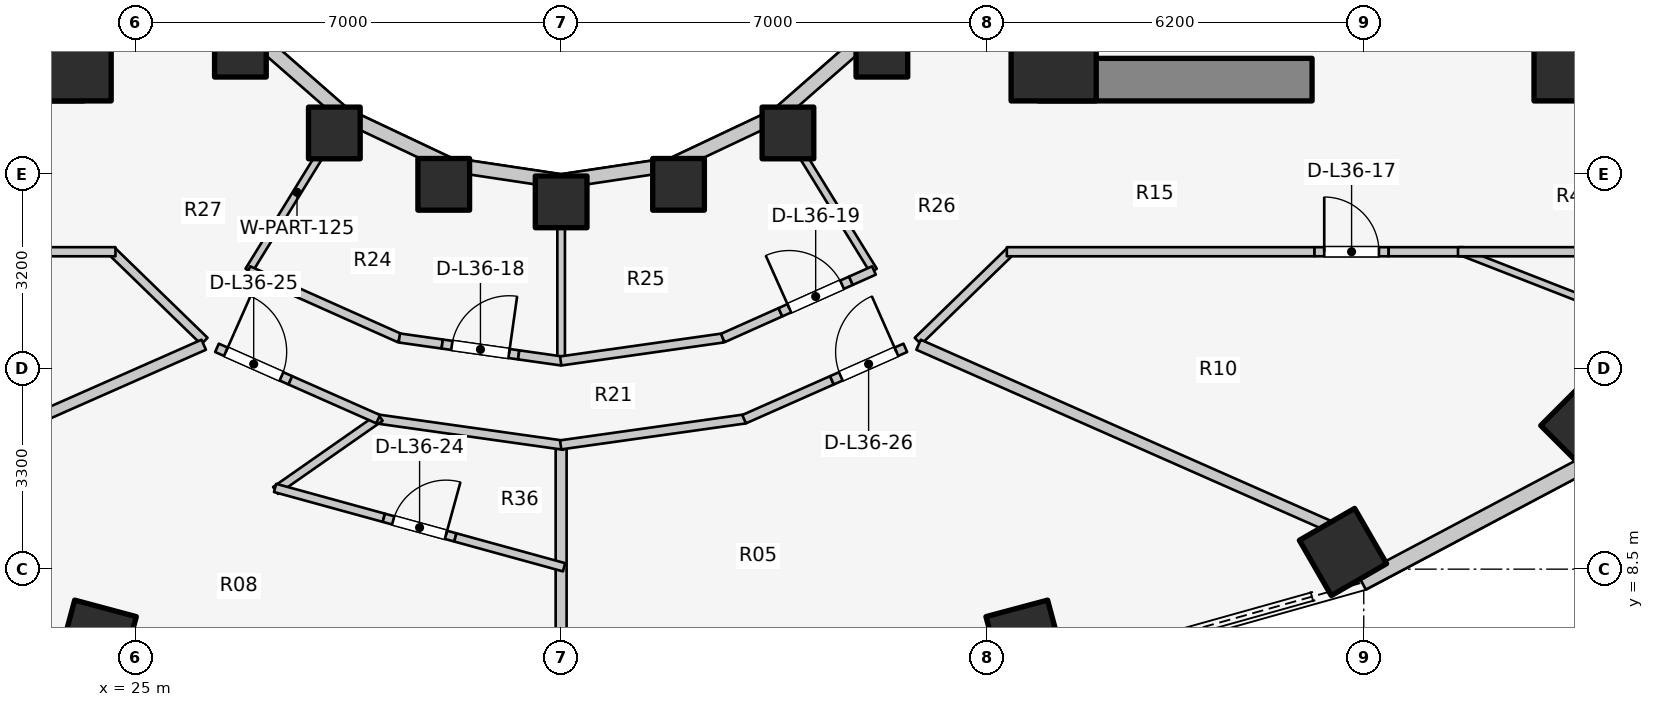
"""IFC4 building model, lengths in metres.
Left out: names, types, materials, properties, quantities, classifications, styles, units other than length and angle.
Written with IfcOpenShell. Run it as: python <this file> out.ifc"""

import sys

from ifc_helpers import new_model, si_unit, direction, frame, frame_2d, origin, origin_2d, place, context, subcontext, project, spatial, rectangle, extrude, element, fill, save


model = new_model("IFC4")
c1 = context("Model", 3, precision=1e-05, world=origin(), true_north=direction((0.0, 1.0)))
c2 = subcontext(c1, "Body", "Model", "MODEL_VIEW")
j1 = project(units=[si_unit("LENGTHUNIT", "METRE"), si_unit("PLANEANGLEUNIT", "RADIAN")], contexts=[c1])
p1 = place(None, origin())
s1 = spatial("IfcSite", under=j1, at=p1, CompositionType="ELEMENT")
p2 = place(p1, origin())
s2 = spatial("IfcBuilding", under=s1, at=p2, CompositionType="ELEMENT")
p3 = place(p2, frame((0.0, 0.0, 119.7)))
s3 = spatial("IfcBuildingStorey", under=s2, at=p3, CompositionType="ELEMENT", Elevation=119.7)
for number, where, z_axis, x_axis in (
    (1, (19.65, 16.55, 0.0), (0.0, 0.0, 1.0), (1.0, 0.0, 0.0)),
    (2, (39.85, 16.55, 0.0), (0.0, 0.0, 1.0), (1.0, 0.0, 0.0)),
):
    element("IfcWall", number, at=place(p3, frame(where, z_axis=z_axis, x_axis=x_axis)), inside=s3, PredefinedType="SHEAR", context=c2, shape_type="SweptSolid", body=[
        extrude(rectangle(XDim=4.5, YDim=0.7, at=frame_2d((2.25, 0.0))), origin(), (0.0, 0.0, 1.0), 3.1),
    ])
for number, where, z_axis, x_axis in (
    (3, (23.9, 16.9, 0.0), (0.0, 0.0, 1.0), (1.0, 0.0, 0.0)),
    (4, (40.1, 16.9, 0.0), (0.0, 0.0, 1.0), (1.0, 0.0, 0.0)),
    (5, (48.7, 16.9, 0.0), (0.0, 0.0, 1.0), (1.0, 0.0, 0.0)),
):
    element("IfcColumn", number, at=place(p3, frame(where, z_axis=z_axis, x_axis=x_axis)), inside=s3, PredefinedType="COLUMN", context=c2, shape_type="SweptSolid", body=[
        extrude(rectangle(XDim=1.4, YDim=1.4, at=origin_2d()), origin(), (0.0, 0.0, 1.0), 3.1),
    ])
for number, where, z_axis, x_axis in (
    (6, (26.725, 17.018, 0.0), (0.0, 0.0, 1.0), (1.0, 0.0, 0.0)),
    (7, (28.27, 15.673, 0.0), (0.0, 0.0, 1.0), (1.0, 0.0, 0.0)),
    (8, (30.069, 14.828, 0.0), (0.0, 0.0, 1.0), (1.0, 0.0, 0.0)),
):
    element("IfcColumn", number, at=place(p3, frame(where, z_axis=z_axis, x_axis=x_axis)), inside=s3, PredefinedType="COLUMN", context=c2, shape_type="SweptSolid", body=[
        extrude(rectangle(XDim=0.85, YDim=0.85, at=origin_2d()), origin(), (0.0, 0.0, 1.0), 3.1),
    ])
p4 = place(p3, frame((24.371, 7.348, 0.0), z_axis=(0.0, 0.0, 1.0), x_axis=(-0.258819045103, -0.965925826289, 0.0)))
e9 = element("IfcColumn", 9, at=p4, inside=s3, PredefinedType="COLUMN", context=c2, shape_type="SweptSolid", body=[
    extrude(rectangle(XDim=1.05, YDim=1.05, at=origin_2d()), origin(), (0.0, 0.0, 1.0), 3.1),
])
for number, where, z_axis, x_axis in (
    (10, (32.0, 14.54, 0.0), (0.0, 0.0, 1.0), (1.0, 0.0, 0.0)),
    (11, (33.931, 14.828, 0.0), (0.0, 0.0, 1.0), (1.0, 0.0, 0.0)),
):
    element("IfcColumn", number, at=place(p3, frame(where, z_axis=z_axis, x_axis=x_axis)), inside=s3, PredefinedType="COLUMN", context=c2, shape_type="SweptSolid", body=[
        extrude(rectangle(XDim=0.85, YDim=0.85, at=origin_2d()), origin(), (0.0, 0.0, 1.0), 3.1),
    ])
p5 = place(p3, frame((39.629, 7.348, 0.0), z_axis=(0.0, 0.0, 1.0), x_axis=(0.258819045103, -0.965925826289, 0.0)))
e12 = element("IfcColumn", 12, at=p5, inside=s3, PredefinedType="COLUMN", context=c2, shape_type="SweptSolid", body=[
    extrude(rectangle(XDim=1.05, YDim=1.05, at=origin_2d()), origin(), (0.0, 0.0, 1.0), 3.1),
])
p6 = place(p3, frame((35.73, 15.673, 0.0), z_axis=(0.0, 0.0, 1.0), x_axis=(1.0, 0.0, 0.0)))
e13 = element("IfcColumn", 13, at=p6, inside=s3, PredefinedType="COLUMN", context=c2, shape_type="SweptSolid", body=[
    extrude(rectangle(XDim=0.85, YDim=0.85, at=origin_2d()), origin(), (0.0, 0.0, 1.0), 3.1),
])
p7 = place(p3, frame((44.858, 8.782, 0.0), z_axis=(0.0, 0.0, 1.0), x_axis=(0.5, -0.866025403784, 0.0)))
e14 = element("IfcColumn", 14, at=p7, inside=s3, PredefinedType="COLUMN", context=c2, shape_type="SweptSolid", body=[
    extrude(rectangle(XDim=1.05, YDim=1.05, at=origin_2d()), origin(), (0.0, 0.0, 1.0), 3.1),
])
p8 = place(p3, frame((37.275, 17.018, 0.0), z_axis=(0.0, 0.0, 1.0), x_axis=(1.0, 0.0, 0.0)))
e15 = element("IfcColumn", 15, at=p8, inside=s3, PredefinedType="COLUMN", context=c2, shape_type="SweptSolid", body=[
    extrude(rectangle(XDim=0.85, YDim=0.85, at=origin_2d()), origin(), (0.0, 0.0, 1.0), 3.1),
])
p9 = place(p3, frame((48.853, 10.862, 0.0), z_axis=(0.0, 0.0, 1.0), x_axis=(0.707106781187, -0.707106781187, 0.0)))
e16 = element("IfcColumn", 16, at=p9, inside=s3, PredefinedType="COLUMN", context=c2, shape_type="SweptSolid", body=[
    extrude(rectangle(XDim=1.05, YDim=1.05, at=origin_2d()), origin(), (0.0, 0.0, 1.0), 3.1),
])
p10 = place(p3, frame((26.965, 17.258, 0.0), z_axis=(0.0, 0.0, 1.0), x_axis=(0.752576694707, -0.658504607869, 0.0)))
e17 = element("IfcWall", 17, at=p10, inside=s3, PredefinedType="STANDARD", context=c2, shape_type="SweptSolid", body=[
    extrude(rectangle(XDim=1.959, YDim=0.23, at=frame_2d((0.98, 0.0))), origin(), (0.0, 0.0, 1.0), 1.22),
])
p11 = place(p3, frame((28.44, 15.968, 0.0), z_axis=(0.0, 0.0, 1.0), x_axis=(0.904179699603, -0.427152280606, 0.0)))
e18 = element("IfcWall", 18, at=p11, inside=s3, PredefinedType="STANDARD", context=c2, shape_type="SweptSolid", body=[
    extrude(rectangle(XDim=1.899, YDim=0.23, at=frame_2d((0.95, 0.0))), origin(), (0.0, 0.0, 1.0), 1.22),
])
for number, where, z_axis, x_axis in (
    (19, (30.157, 15.157, 0.0), (0.0, 0.0, 1.0), (0.989, -0.149, 0.0)),
    (20, (32.0, 14.88, 0.0), (0.0, 0.0, 1.0), (0.989, 0.149, 0.0)),
):
    element("IfcWall", number, at=place(p3, frame(where, z_axis=z_axis, x_axis=x_axis)), inside=s3, PredefinedType="STANDARD", context=c2, shape_type="SweptSolid", body=[
        extrude(rectangle(XDim=1.864, YDim=0.23, at=frame_2d((0.932, 0.0))), origin(), (0.0, 0.0, 1.0), 1.22),
    ])
p12 = place(p3, frame((33.843, 15.157, 0.0), z_axis=(0.0, 0.0, 1.0), x_axis=(0.904179699603, 0.427152280606, 0.0)))
e21 = element("IfcWall", 21, at=p12, inside=s3, PredefinedType="STANDARD", context=c2, shape_type="SweptSolid", body=[
    extrude(rectangle(XDim=1.899, YDim=0.23, at=frame_2d((0.95, 0.0))), origin(), (0.0, 0.0, 1.0), 1.22),
])
p13 = place(p3, frame((35.56, 15.968, 0.0), z_axis=(0.0, 0.0, 1.0), x_axis=(0.752576694707, 0.658504607869, 0.0)))
e22 = element("IfcWall", 22, at=p13, inside=s3, PredefinedType="STANDARD", context=c2, shape_type="SweptSolid", body=[
    extrude(rectangle(XDim=1.959, YDim=0.23, at=frame_2d((0.98, 0.0))), origin(), (0.0, 0.0, 1.0), 1.22),
])
p14 = place(p3, frame((45.173, 8.279, 0.0), z_axis=(0.0, 0.0, 1.0), x_axis=(0.883668636807, 0.4681129568, 0.0)))
e23 = element("IfcWall", 23, at=p14, inside=s3, PredefinedType="STANDARD", context=c2, shape_type="SweptSolid", body=[
    extrude(rectangle(XDim=4.631, YDim=0.26, at=frame_2d((2.316, 0.0))), origin(), (0.0, 0.0, 1.0), 1.22),
])
p15 = place(p3, frame((26.133, 12.251, 0.0), z_axis=(0.0, 0.0, 1.0), x_axis=(-0.717419568599, 0.696641344302, 0.0)))
e24 = element("IfcWall", 24, at=p15, inside=s3, PredefinedType="PARTITIONING", context=c2, shape_type="SweptSolid", body=[
    extrude(rectangle(XDim=2.138, YDim=0.15, at=frame_2d((1.069, 0.0))), origin(), (0.0, 0.0, 1.0), 1.992),
])
p16 = place(p3, frame((19.51, 13.72, 0.0), z_axis=(0.0, 0.0, 1.0), x_axis=(1.0, 0.0, 0.0)))
e25 = element("IfcWall", 25, at=p16, inside=s3, PredefinedType="PARTITIONING", context=c2, shape_type="SweptSolid", body=[
    extrude(rectangle(XDim=5.16, YDim=0.15, at=frame_2d((2.58, 0.0))), origin(), (0.0, 0.0, 1.0), 1.992),
])
p17 = place(p3, frame((46.753, 13.738, 0.0), z_axis=(0.0, 0.0, 1.0), x_axis=(0.931516768814, -0.36369837698, 0.0)))
e26 = element("IfcWall", 26, at=p17, inside=s3, PredefinedType="MOVABLE", context=c2, shape_type="SweptSolid", body=[
    extrude(rectangle(XDim=3.48, YDim=0.12, at=frame_2d((1.74, 0.0))), origin(), (0.0, 0.0, 1.0), 1.22),
])
p18 = place(p3, frame((37.867, 12.251, 0.0), z_axis=(0.0, 0.0, 1.0), x_axis=(0.717419568599, 0.696641344302, 0.0)))
e27 = element("IfcWall", 27, at=p18, inside=s3, PredefinedType="PARTITIONING", context=c2, shape_type="SweptSolid", body=[
    extrude(rectangle(XDim=2.138, YDim=0.15, at=frame_2d((1.069, 0.0))), origin(), (0.0, 0.0, 1.0), 1.992),
])
p19 = place(p3, frame((39.33, 13.72, 0.0), z_axis=(0.0, 0.0, 1.0), x_axis=(1.0, 0.0, 0.0)))
e28 = element("IfcWall", 28, at=p19, inside=s3, PredefinedType="PARTITIONING", context=c2, shape_type="SweptSolid", body=[
    extrude(rectangle(XDim=5.06, YDim=0.15, at=frame_2d((2.53, 0.0))), origin(), (0.0, 0.0, 1.0), 1.992),
])
p20 = place(p3, frame((44.39, 13.72, 0.0), z_axis=(0.0, 0.0, 1.0), x_axis=(1.0, 0.0, 0.0)))
e29 = element("IfcWall", 29, at=p20, inside=s3, PredefinedType="PARTITIONING", context=c2, shape_type="SweptSolid", body=[
    extrude(rectangle(XDim=1.22, YDim=0.15, at=frame_2d((0.61, 0.0))), origin(), (0.0, 0.0, 1.0), 2.575),
])
p21 = place(p20, frame((0.16, 0.0, 0.0)))
e30 = element("IfcOpeningElement", 30, at=p21, cuts=e29, PredefinedType="OPENING", context=c2, shape_type="SweptSolid", body=[
    extrude(rectangle(XDim=0.9, YDim=2.1, at=frame_2d((0.45, 1.05))), frame((0.0, 0.085, 0.0), z_axis=(0.0, -1.0, 0.0), x_axis=(1.0, 0.0, 0.0)), (0.0, 0.0, 1.0), 0.17),
])
p22 = place(p3, frame((45.61, 13.72, 0.0), z_axis=(0.0, 0.0, 1.0), x_axis=(1.0, 0.0, 0.0)))
e31 = element("IfcWall", 31, at=p22, inside=s3, PredefinedType="PARTITIONING", context=c2, shape_type="SweptSolid", body=[
    extrude(rectangle(XDim=1.24, YDim=0.15, at=frame_2d((0.62, 0.0))), origin(), (0.0, 0.0, 1.0), 2.575),
])
p23 = place(p3, frame((46.75, 13.72, 0.0), z_axis=(0.0, 0.0, 1.0), x_axis=(1.0, 0.0, 0.0)))
e32 = element("IfcWall", 32, at=p23, inside=s3, PredefinedType="PARTITIONING", context=c2, shape_type="SweptSolid", body=[
    extrude(rectangle(XDim=5.05, YDim=0.15, at=frame_2d((2.525, 0.0))), origin(), (0.0, 0.0, 1.0), 1.22),
])
p24 = place(p3, frame((28.45, 15.985, 0.0), z_axis=(0.0, 0.0, 1.0), x_axis=(-0.524565340045, -0.851370192116, 0.0)))
e33 = element("IfcWall", 33, at=p24, inside=s3, PredefinedType="PARTITIONING", context=c2, shape_type="SweptSolid", body=[
    extrude(rectangle(XDim=3.027, YDim=0.125, at=frame_2d((1.514, 0.0))), origin(), (0.0, 0.0, 1.0), 1.992),
])
p25 = place(p3, frame((32.0, 14.9, 0.0), z_axis=(0.0, 0.0, 1.0), x_axis=(0.0, -1.0, 0.0)))
e34 = element("IfcWall", 34, at=p25, inside=s3, PredefinedType="PARTITIONING", context=c2, shape_type="SweptSolid", body=[
    extrude(rectangle(XDim=2.976, YDim=0.125, at=frame_2d((1.488, 0.0))), origin(), (0.0, 0.0, 1.0), 1.992),
])
p26 = place(p3, frame((35.55, 15.985, 0.0), z_axis=(0.0, 0.0, 1.0), x_axis=(0.524565340045, -0.851370192116, 0.0)))
e35 = element("IfcWall", 35, at=p26, inside=s3, PredefinedType="PARTITIONING", context=c2, shape_type="SweptSolid", body=[
    extrude(rectangle(XDim=3.027, YDim=0.125, at=frame_2d((1.514, 0.0))), origin(), (0.0, 0.0, 1.0), 1.992),
])
p27 = place(p3, frame((26.856, 13.412, 0.0), z_axis=(0.0, 0.0, 1.0), x_axis=(0.912985265053, -0.407992531545, 0.0)))
e36 = element("IfcWall", 36, at=p27, inside=s3, PredefinedType="PARTITIONING", context=c2, shape_type="SweptSolid", body=[
    extrude(rectangle(XDim=2.723, YDim=0.15, at=frame_2d((1.362, 0.0))), origin(), (0.0, 0.0, 1.0), 1.992),
])
p28 = place(p3, frame((29.339, 12.302, 0.0), z_axis=(0.0, 0.0, 1.0), x_axis=(0.990086065041, -0.140462036909, 0.0)))
e37 = element("IfcWall", 37, at=p28, inside=s3, PredefinedType="PARTITIONING", context=c2, shape_type="SweptSolid", body=[
    extrude(rectangle(XDim=0.713, YDim=0.15, at=frame_2d((0.356, 0.0))), origin(), (0.0, 0.0, 1.0), 2.575),
])
p29 = place(p3, frame((30.044, 12.202, 0.0), z_axis=(0.0, 0.0, 1.0), x_axis=(0.990129408, -0.14015618222, 0.0)))
e38 = element("IfcWall", 38, at=p29, inside=s3, PredefinedType="PARTITIONING", context=c2, shape_type="SweptSolid", body=[
    extrude(rectangle(XDim=1.27, YDim=0.15, at=frame_2d((0.635, 0.0))), origin(), (0.0, 0.0, 1.0), 2.575),
])
p30 = place(p29, frame((0.16, 0.0, 0.0)))
e39 = element("IfcOpeningElement", 39, at=p30, cuts=e38, PredefinedType="OPENING", context=c2, shape_type="SweptSolid", body=[
    extrude(rectangle(XDim=0.95, YDim=2.1, at=frame_2d((0.475, 1.05))), frame((0.0, 0.085, 0.0), z_axis=(0.0, -1.0, 0.0), x_axis=(1.0, 0.0, 0.0)), (0.0, 0.0, 1.0), 0.17),
])
p31 = place(p3, frame((31.302, 12.024, 0.0), z_axis=(0.0, 0.0, 1.0), x_axis=(0.990133654237, -0.140126181517, 0.0)))
e40 = element("IfcWall", 40, at=p31, inside=s3, PredefinedType="PARTITIONING", context=c2, shape_type="SweptSolid", body=[
    extrude(rectangle(XDim=0.713, YDim=0.15, at=frame_2d((0.356, 0.0))), origin(), (0.0, 0.0, 1.0), 1.992),
])
p32 = place(p3, frame((31.993, 11.924, 0.0), z_axis=(0.0, 0.0, 1.0), x_axis=(0.990119079966, 0.140229124958, 0.0)))
e41 = element("IfcWall", 41, at=p32, inside=s3, PredefinedType="PARTITIONING", context=c2, shape_type="SweptSolid", body=[
    extrude(rectangle(XDim=2.695, YDim=0.15, at=frame_2d((1.348, 0.0))), origin(), (0.0, 0.0, 1.0), 1.992),
])
p33 = place(p3, frame((34.658, 12.301, 0.0), z_axis=(0.0, 0.0, 1.0), x_axis=(0.912995674005, 0.407969238114, 0.0)))
e42 = element("IfcWall", 42, at=p33, inside=s3, PredefinedType="PARTITIONING", context=c2, shape_type="SweptSolid", body=[
    extrude(rectangle(XDim=1.039, YDim=0.15, at=frame_2d((0.52, 0.0))), origin(), (0.0, 0.0, 1.0), 1.992),
])
p34 = place(p3, frame((35.606, 12.725, 0.0), z_axis=(0.0, 0.0, 1.0), x_axis=(0.9129294776, 0.408117347009, 0.0)))
e43 = element("IfcWall", 43, at=p34, inside=s3, PredefinedType="PARTITIONING", context=c2, shape_type="SweptSolid", body=[
    extrude(rectangle(XDim=1.27, YDim=0.15, at=frame_2d((0.635, 0.0))), origin(), (0.0, 0.0, 1.0), 2.16),
])
p35 = place(p34, frame((0.16, 0.0, 0.0)))
e44 = element("IfcOpeningElement", 44, at=p35, cuts=e43, PredefinedType="OPENING", context=c2, shape_type="SweptSolid", body=[
    extrude(rectangle(XDim=0.95, YDim=2.1, at=frame_2d((0.475, 1.05))), frame((0.0, 0.085, 0.0), z_axis=(0.0, -1.0, 0.0), x_axis=(1.0, 0.0, 0.0)), (0.0, 0.0, 1.0), 0.17),
])
p36 = place(p3, frame((36.766, 13.243, 0.0), z_axis=(0.0, 0.0, 1.0), x_axis=(0.91313005036, 0.407668383774, 0.0)))
e45 = element("IfcWall", 45, at=p36, inside=s3, PredefinedType="PARTITIONING", context=c2, shape_type="SweptSolid", body=[
    extrude(rectangle(XDim=0.414, YDim=0.15, at=frame_2d((0.207, 0.0))), origin(), (0.0, 0.0, 1.0), 2.575),
])
p37 = place(p3, frame((26.122, 12.191, 0.0), z_axis=(0.0, 0.0, 1.0), x_axis=(-0.914765930761, -0.403984271872, 0.0)))
e46 = element("IfcWall", 46, at=p37, inside=s3, PredefinedType="PARTITIONING", context=c2, shape_type="SweptSolid", body=[
    extrude(rectangle(XDim=7.354, YDim=0.18, at=frame_2d((3.677, 0.0))), origin(), (0.0, 0.0, 1.0), 1.22),
])
p38 = place(p3, frame((32.0, 10.489, 0.0), z_axis=(0.0, 0.0, 1.0), x_axis=(0.0, -1.0, 0.0)))
e47 = element("IfcWall", 47, at=p38, inside=s3, PredefinedType="PARTITIONING", context=c2, shape_type="SweptSolid", body=[
    extrude(rectangle(XDim=3.064, YDim=0.18, at=frame_2d((1.532, 0.0))), origin(), (0.0, 0.0, 1.0), 1.22),
])
p39 = place(p3, frame((37.878, 12.191, 0.0), z_axis=(0.0, 0.0, 1.0), x_axis=(0.914765930761, -0.403984271872, 0.0)))
e48 = element("IfcWall", 48, at=p39, inside=s3, PredefinedType="PARTITIONING", context=c2, shape_type="SweptSolid", body=[
    extrude(rectangle(XDim=7.354, YDim=0.18, at=frame_2d((3.677, 0.0))), origin(), (0.0, 0.0, 1.0), 1.22),
])
p40 = place(p3, frame((28.934, 10.975, 0.0), z_axis=(0.0, 0.0, 1.0), x_axis=(0.990254405439, -0.139270285808, 0.0)))
e49 = element("IfcWall", 49, at=p40, inside=s3, PredefinedType="PARTITIONING", context=c2, shape_type="SweptSolid", body=[
    extrude(rectangle(XDim=3.147, YDim=0.15, at=frame_2d((1.573, 0.0))), origin(), (0.0, 0.0, 1.0), 1.992),
])
p41 = place(p3, frame((29.024, 10.997, 0.0), z_axis=(0.0, 0.0, 1.0), x_axis=(-0.819614061163, -0.572916041619, 0.0)))
e50 = element("IfcWall", 50, at=p41, inside=s3, PredefinedType="PLUMBINGWALL", context=c2, shape_type="SweptSolid", body=[
    extrude(rectangle(XDim=2.1, YDim=0.14, at=frame_2d((1.05, 0.0))), origin(), (0.0, 0.0, 1.0), 2.105),
])
p42 = place(p3, frame((27.296, 9.836, 0.0), z_axis=(0.0, 0.0, 1.0), x_axis=(0.964309670354, -0.264776999875, 0.0)))
e51 = element("IfcWall", 51, at=p42, inside=s3, PredefinedType="PLUMBINGWALL", context=c2, shape_type="SweptSolid", body=[
    extrude(rectangle(XDim=1.854, YDim=0.14, at=frame_2d((0.927, 0.0))), origin(), (0.0, 0.0, 1.0), 2.575),
])
p43 = place(p3, frame((29.084, 9.345, 0.0), z_axis=(0.0, 0.0, 1.0), x_axis=(0.964319136296, -0.264742522789, 0.0)))
e52 = element("IfcWall", 52, at=p43, inside=s3, PredefinedType="PLUMBINGWALL", context=c2, shape_type="SweptSolid", body=[
    extrude(rectangle(XDim=1.22, YDim=0.14, at=frame_2d((0.61, 0.0))), origin(), (0.0, 0.0, 1.0), 2.575),
])
p44 = place(p43, frame((0.16, 0.0, 0.0)))
e53 = element("IfcOpeningElement", 53, at=p44, cuts=e52, PredefinedType="OPENING", context=c2, shape_type="SweptSolid", body=[
    extrude(rectangle(XDim=0.9, YDim=2.1, at=frame_2d((0.45, 1.05))), frame((0.0, 0.08, 0.0), z_axis=(0.0, -1.0, 0.0), x_axis=(1.0, 0.0, 0.0)), (0.0, 0.0, 1.0), 0.16),
])
p45 = place(p3, frame((30.26, 9.022, 0.0), z_axis=(0.0, 0.0, 1.0), x_axis=(0.964300438022, -0.264810621448, 0.0)))
e54 = element("IfcWall", 54, at=p45, inside=s3, PredefinedType="PLUMBINGWALL", context=c2, shape_type="SweptSolid", body=[
    extrude(rectangle(XDim=1.854, YDim=0.14, at=frame_2d((0.927, 0.0))), origin(), (0.0, 0.0, 1.0), 1.992),
])
p46 = place(p3, frame((26.34, 12.14, 0.0), z_axis=(0.0, 0.0, 1.0), x_axis=(0.914481389177, -0.404627963503, 0.0)))
e55 = element("IfcWall", 55, at=p46, inside=s3, PredefinedType="PARTITIONING", context=c2, shape_type="SweptSolid", body=[
    extrude(rectangle(XDim=1.32, YDim=0.15, at=frame_2d((0.66, 0.0))), origin(), (0.0, 0.0, 1.0), 2.16),
])
p47 = place(p46, frame((0.16, 0.0, 0.0)))
e56 = element("IfcOpeningElement", 56, at=p47, cuts=e55, PredefinedType="OPENING", context=c2, shape_type="SweptSolid", body=[
    extrude(rectangle(XDim=1.0, YDim=2.1, at=frame_2d((0.5, 1.05))), frame((0.0, 0.085, 0.0), z_axis=(0.0, -1.0, 0.0), x_axis=(1.0, 0.0, 0.0)), (0.0, 0.0, 1.0), 0.17),
])
p48 = place(p3, frame((27.547, 11.605, 0.0), z_axis=(0.0, 0.0, 1.0), x_axis=(0.914435226441, -0.404732277738, 0.0)))
e57 = element("IfcWall", 57, at=p48, inside=s3, PredefinedType="PARTITIONING", context=c2, shape_type="SweptSolid", body=[
    extrude(rectangle(XDim=1.579, YDim=0.15, at=frame_2d((0.79, 0.0))), origin(), (0.0, 0.0, 1.0), 1.992),
])
p49 = place(p3, frame((31.992, 10.544, 0.0), z_axis=(0.0, 0.0, 1.0), x_axis=(0.990243864279, 0.139345216129, 0.0)))
e58 = element("IfcWall", 58, at=p49, inside=s3, PredefinedType="PARTITIONING", context=c2, shape_type="SweptSolid", body=[
    extrude(rectangle(XDim=3.062, YDim=0.15, at=frame_2d((1.531, 0.0))), origin(), (0.0, 0.0, 1.0), 1.992),
])
p50 = place(p3, frame((35.009, 10.966, 0.0), z_axis=(0.0, 0.0, 1.0), x_axis=(0.914460545164, 0.404675068837, 0.0)))
e59 = element("IfcWall", 59, at=p50, inside=s3, PredefinedType="PARTITIONING", context=c2, shape_type="SweptSolid", body=[
    extrude(rectangle(XDim=1.579, YDim=0.15, at=frame_2d((0.79, 0.0))), origin(), (0.0, 0.0, 1.0), 1.992),
])
p51 = place(p3, frame((36.453, 11.605, 0.0), z_axis=(0.0, 0.0, 1.0), x_axis=(0.914451103971, 0.404696402809, 0.0)))
e60 = element("IfcWall", 60, at=p51, inside=s3, PredefinedType="PARTITIONING", context=c2, shape_type="SweptSolid", body=[
    extrude(rectangle(XDim=1.32, YDim=0.15, at=frame_2d((0.66, 0.0))), origin(), (0.0, 0.0, 1.0), 2.16),
])
p52 = place(p51, frame((0.16, 0.0, 0.0)))
e61 = element("IfcOpeningElement", 61, at=p52, cuts=e60, PredefinedType="OPENING", context=c2, shape_type="SweptSolid", body=[
    extrude(rectangle(XDim=1.0, YDim=2.1, at=frame_2d((0.5, 1.05))), frame((0.0, 0.085, 0.0), z_axis=(0.0, -1.0, 0.0), x_axis=(1.0, 0.0, 0.0)), (0.0, 0.0, 1.0), 0.17),
])
p53 = place(p21, origin())
e62 = element("IfcDoor", 62, at=p53, inside=s3, OperationType="SINGLE_SWING_LEFT", PredefinedType="DOOR", context=c2, shape_type="SweptSolid", body=[
    extrude(rectangle(XDim=0.9, YDim=2.1, at=frame_2d((0.45, 1.05))), frame((0.0, 0.025, 0.0), z_axis=(0.0, -1.0, 0.0), x_axis=(1.0, 0.0, 0.0)), (0.0, 0.0, 1.0), 0.05),
])
fill(e30, e62)
p54 = place(p30, origin())
e63 = element("IfcDoor", 63, at=p54, inside=s3, OperationType="SINGLE_SWING_RIGHT", PredefinedType="DOOR", context=c2, shape_type="SweptSolid", body=[
    extrude(rectangle(XDim=0.95, YDim=2.1, at=frame_2d((0.475, 1.05))), frame((0.0, 0.025, 0.0), z_axis=(0.0, -1.0, 0.0), x_axis=(1.0, 0.0, 0.0)), (0.0, 0.0, 1.0), 0.05),
])
fill(e39, e63)
p55 = place(p35, origin())
e64 = element("IfcDoor", 64, at=p55, inside=s3, OperationType="SINGLE_SWING_LEFT", PredefinedType="DOOR", context=c2, shape_type="SweptSolid", body=[
    extrude(rectangle(XDim=0.95, YDim=2.1, at=frame_2d((0.475, 1.05))), frame((0.0, 0.025, 0.0), z_axis=(0.0, -1.0, 0.0), x_axis=(1.0, 0.0, 0.0)), (0.0, 0.0, 1.0), 0.05),
])
fill(e44, e64)
p56 = place(p44, origin())
e65 = element("IfcDoor", 65, at=p56, inside=s3, OperationType="SINGLE_SWING_RIGHT", PredefinedType="DOOR", context=c2, shape_type="SweptSolid", body=[
    extrude(rectangle(XDim=0.9, YDim=2.1, at=frame_2d((0.45, 1.05))), frame((0.0, 0.025, 0.0), z_axis=(0.0, -1.0, 0.0), x_axis=(1.0, 0.0, 0.0)), (0.0, 0.0, 1.0), 0.05),
])
fill(e53, e65)
p57 = place(p47, origin())
e66 = element("IfcDoor", 66, at=p57, inside=s3, OperationType="SINGLE_SWING_LEFT", PredefinedType="DOOR", context=c2, shape_type="SweptSolid", body=[
    extrude(rectangle(XDim=1.0, YDim=2.1, at=frame_2d((0.5, 1.05))), frame((0.0, 0.025, 0.0), z_axis=(0.0, -1.0, 0.0), x_axis=(1.0, 0.0, 0.0)), (0.0, 0.0, 1.0), 0.05),
])
fill(e56, e66)
p58 = place(p52, origin())
e67 = element("IfcDoor", 67, at=p58, inside=s3, OperationType="SINGLE_SWING_RIGHT", PredefinedType="DOOR", context=c2, shape_type="SweptSolid", body=[
    extrude(rectangle(XDim=1.0, YDim=2.1, at=frame_2d((0.5, 1.05))), frame((0.0, 0.025, 0.0), z_axis=(0.0, -1.0, 0.0), x_axis=(1.0, 0.0, 0.0)), (0.0, 0.0, 1.0), 0.05),
])
fill(e61, e67)
save(model, sys.argv[1])
